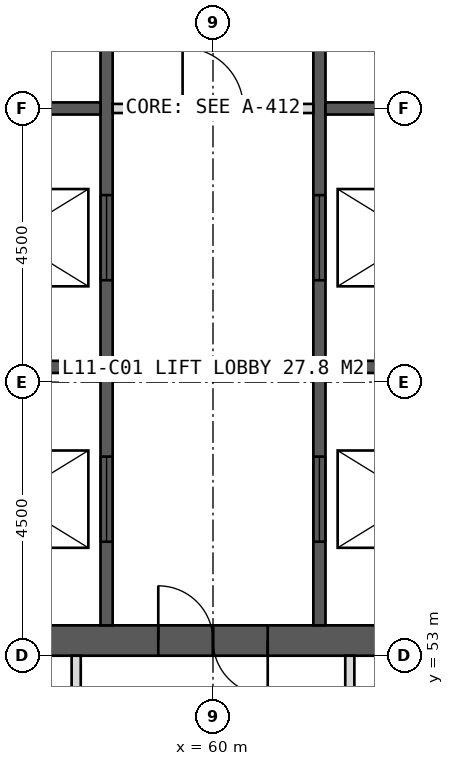
"""IFC4 building model, lengths in metres.
Left out: names, types, materials, properties, quantities, classifications, styles, units other than length and angle.
Written with IfcOpenShell. Run it as: python <this file> out.ifc"""

import sys

from ifc_helpers import new_model, si_unit, direction, frame, frame_2d, origin, place, context, subcontext, project, spatial, rectangle, extrude, element, fill, save


model = new_model("IFC4")
c1 = context("Model", 3, precision=1e-05, world=origin(), true_north=direction((0.0, 1.0)))
c2 = subcontext(c1, "Body", "Model", "MODEL_VIEW")
j1 = project(units=[si_unit("LENGTHUNIT", "METRE"), si_unit("PLANEANGLEUNIT", "RADIAN")], contexts=[c1])
p1 = place(None, origin())
s1 = spatial("IfcSite", under=j1, at=p1, CompositionType="ELEMENT")
p2 = place(p1, origin())
s2 = spatial("IfcBuilding", under=s1, at=p2, CompositionType="ELEMENT")
p3 = place(p2, frame((0.0, 0.0, 51.0)))
s3 = spatial("IfcBuildingStorey", under=s2, at=p3, CompositionType="ELEMENT", Elevation=51.0)
p4 = place(p3, frame((51.0, 53.25, 0.0), z_axis=(0.0, 0.0, 1.0), x_axis=(1.0, 0.0, 0.0)))
e1 = element("IfcWall", 1, at=p4, inside=s3, PredefinedType="SHEAR", context=c2, shape_type="SweptSolid", body=[
    extrude(rectangle(XDim=18.0, YDim=0.5, at=frame_2d((9.0, 0.0))), origin(), (0.0, 0.0, 1.0), 4.0),
])
p5 = place(p4, frame((8.1, 0.0, 0.0)))
e2 = element("IfcOpeningElement", 2, at=p5, cuts=e1, PredefinedType="OPENING", context=c2, shape_type="SweptSolid", body=[
    extrude(rectangle(XDim=1.8, YDim=2.2, at=frame_2d((0.9, 1.1))), frame((0.0, 0.26, 0.0), z_axis=(0.0, -1.0, 0.0), x_axis=(1.0, 0.0, 0.0)), (0.0, 0.0, 1.0), 0.52),
])
p6 = place(p3, frame((58.25, 53.5, 0.0), z_axis=(0.0, 0.0, 1.0), x_axis=(0.0, 1.0, 0.0)))
e3 = element("IfcWall", 3, at=p6, inside=s3, PredefinedType="SHEAR", context=c2, shape_type="SweptSolid", body=[
    extrude(rectangle(XDim=17.0, YDim=0.2, at=frame_2d((8.5, 0.0))), origin(), (0.0, 0.0, 1.0), 4.0),
])
p7 = place(p6, frame((1.375, 0.0, 0.0)))
e4 = element("IfcOpeningElement", 4, at=p7, cuts=e3, PredefinedType="OPENING", context=c2, shape_type="SweptSolid", body=[
    extrude(rectangle(XDim=1.4, YDim=2.2, at=frame_2d((0.7, 1.1))), frame((0.0, 0.11, 0.0), z_axis=(0.0, -1.0, 0.0), x_axis=(1.0, 0.0, 0.0)), (0.0, 0.0, 1.0), 0.22),
])
p8 = place(p6, frame((5.675, 0.0, 0.0)))
e5 = element("IfcOpeningElement", 5, at=p8, cuts=e3, PredefinedType="OPENING", context=c2, shape_type="SweptSolid", body=[
    extrude(rectangle(XDim=1.4, YDim=2.2, at=frame_2d((0.7, 1.1))), frame((0.0, 0.11, 0.0), z_axis=(0.0, -1.0, 0.0), x_axis=(1.0, 0.0, 0.0)), (0.0, 0.0, 1.0), 0.22),
])
p9 = place(p3, frame((61.75, 53.5, 0.0), z_axis=(0.0, 0.0, 1.0), x_axis=(0.0, 1.0, 0.0)))
e6 = element("IfcWall", 6, at=p9, inside=s3, PredefinedType="SHEAR", context=c2, shape_type="SweptSolid", body=[
    extrude(rectangle(XDim=17.0, YDim=0.2, at=frame_2d((8.5, 0.0))), origin(), (0.0, 0.0, 1.0), 4.0),
])
p10 = place(p9, frame((1.375, 0.0, 0.0)))
e7 = element("IfcOpeningElement", 7, at=p10, cuts=e6, PredefinedType="OPENING", context=c2, shape_type="SweptSolid", body=[
    extrude(rectangle(XDim=1.4, YDim=2.2, at=frame_2d((0.7, 1.1))), frame((0.0, 0.11, 0.0), z_axis=(0.0, -1.0, 0.0), x_axis=(1.0, 0.0, 0.0)), (0.0, 0.0, 1.0), 0.22),
])
p11 = place(p9, frame((5.675, 0.0, 0.0)))
e8 = element("IfcOpeningElement", 8, at=p11, cuts=e6, PredefinedType="OPENING", context=c2, shape_type="SweptSolid", body=[
    extrude(rectangle(XDim=1.4, YDim=2.2, at=frame_2d((0.7, 1.1))), frame((0.0, 0.11, 0.0), z_axis=(0.0, -1.0, 0.0), x_axis=(1.0, 0.0, 0.0)), (0.0, 0.0, 1.0), 0.22),
])
for number, where, z_axis, x_axis in (
    (9, (55.1, 57.75, 0.0), (0.0, 0.0, 1.0), (1.0, 0.0, 0.0)),
    (10, (61.85, 57.75, 0.0), (0.0, 0.0, 1.0), (1.0, 0.0, 0.0)),
    (11, (55.1, 62.0, 0.0), (0.0, 0.0, 1.0), (1.0, 0.0, 0.0)),
    (12, (61.85, 62.0, 0.0), (0.0, 0.0, 1.0), (1.0, 0.0, 0.0)),
):
    element("IfcWall", number, at=place(p3, frame(where, z_axis=z_axis, x_axis=x_axis)), inside=s3, PredefinedType="SHEAR", context=c2, shape_type="SweptSolid", body=[
        extrude(rectangle(XDim=3.05, YDim=0.2, at=frame_2d((1.525, 0.0))), origin(), (0.0, 0.0, 1.0), 4.0),
    ])
for number, where, z_axis, x_axis in (
    (13, (62.25, 53.0, 0.0), (0.0, 0.0, 1.0), (0.0, -1.0, 0.0)),
    (14, (57.75, 53.0, 0.0), (0.0, 0.0, 1.0), (0.0, -1.0, 0.0)),
):
    element("IfcWall", number, at=place(p3, frame(where, z_axis=z_axis, x_axis=x_axis)), inside=s3, PredefinedType="PARTITIONING", context=c2, shape_type="SweptSolid", body=[
        extrude(rectangle(XDim=7.2, YDim=0.15, at=frame_2d((3.6, 0.0))), origin(), (0.0, 0.0, 1.0), 3.75),
    ])
p12 = place(p3, frame((58.35, 62.0, 0.0), z_axis=(0.0, 0.0, 1.0), x_axis=(1.0, 0.0, 0.0)))
e15 = element("IfcWall", 15, at=p12, inside=s3, PredefinedType="PARTITIONING", context=c2, shape_type="SweptSolid", body=[
    extrude(rectangle(XDim=3.3, YDim=0.15, at=frame_2d((1.65, 0.0))), origin(), (0.0, 0.0, 1.0), 3.75),
])
p13 = place(p12, frame((1.15, 0.0, 0.0)))
e16 = element("IfcOpeningElement", 16, at=p13, cuts=e15, PredefinedType="OPENING", context=c2, shape_type="SweptSolid", body=[
    extrude(rectangle(XDim=1.0, YDim=2.1, at=frame_2d((0.5, 1.05))), frame((0.0, 0.085, 0.0), z_axis=(0.0, -1.0, 0.0), x_axis=(1.0, 0.0, 0.0)), (0.0, 0.0, 1.0), 0.17),
])
p14 = place(p5, origin())
e17 = element("IfcDoor", 17, at=p14, inside=s3, OperationType="DOUBLE_DOOR_SINGLE_SWING", PredefinedType="DOOR", context=c2, shape_type="SweptSolid", body=[
    extrude(rectangle(XDim=1.8, YDim=2.2, at=frame_2d((0.9, 1.1))), frame((0.0, 0.025, 0.0), z_axis=(0.0, -1.0, 0.0), x_axis=(1.0, 0.0, 0.0)), (0.0, 0.0, 1.0), 0.05),
])
fill(e2, e17)
p15 = place(p7, origin())
e18 = element("IfcDoor", 18, at=p15, inside=s3, OperationType="SLIDING_TO_LEFT", PredefinedType="DOOR", context=c2, shape_type="SweptSolid", body=[
    extrude(rectangle(XDim=1.4, YDim=2.2, at=frame_2d((0.7, 1.1))), frame((0.0, 0.025, 0.0), z_axis=(0.0, -1.0, 0.0), x_axis=(1.0, 0.0, 0.0)), (0.0, 0.0, 1.0), 0.05),
])
fill(e4, e18)
p16 = place(p10, origin())
e19 = element("IfcDoor", 19, at=p16, inside=s3, OperationType="SLIDING_TO_LEFT", PredefinedType="DOOR", context=c2, shape_type="SweptSolid", body=[
    extrude(rectangle(XDim=1.4, YDim=2.2, at=frame_2d((0.7, 1.1))), frame((0.0, 0.025, 0.0), z_axis=(0.0, -1.0, 0.0), x_axis=(1.0, 0.0, 0.0)), (0.0, 0.0, 1.0), 0.05),
])
fill(e7, e19)
p17 = place(p8, origin())
e20 = element("IfcDoor", 20, at=p17, inside=s3, OperationType="SLIDING_TO_LEFT", PredefinedType="DOOR", context=c2, shape_type="SweptSolid", body=[
    extrude(rectangle(XDim=1.4, YDim=2.2, at=frame_2d((0.7, 1.1))), frame((0.0, 0.025, 0.0), z_axis=(0.0, -1.0, 0.0), x_axis=(1.0, 0.0, 0.0)), (0.0, 0.0, 1.0), 0.05),
])
fill(e5, e20)
p18 = place(p11, origin())
e21 = element("IfcDoor", 21, at=p18, inside=s3, OperationType="SLIDING_TO_LEFT", PredefinedType="DOOR", context=c2, shape_type="SweptSolid", body=[
    extrude(rectangle(XDim=1.4, YDim=2.2, at=frame_2d((0.7, 1.1))), frame((0.0, 0.025, 0.0), z_axis=(0.0, -1.0, 0.0), x_axis=(1.0, 0.0, 0.0)), (0.0, 0.0, 1.0), 0.05),
])
fill(e8, e21)
p19 = place(p13, origin())
e22 = element("IfcDoor", 22, at=p19, inside=s3, OperationType="SINGLE_SWING_LEFT", PredefinedType="DOOR", context=c2, shape_type="SweptSolid", body=[
    extrude(rectangle(XDim=1.0, YDim=2.1, at=frame_2d((0.5, 1.05))), frame((0.0, 0.025, 0.0), z_axis=(0.0, -1.0, 0.0), x_axis=(1.0, 0.0, 0.0)), (0.0, 0.0, 1.0), 0.05),
])
fill(e16, e22)
save(model, sys.argv[1])
